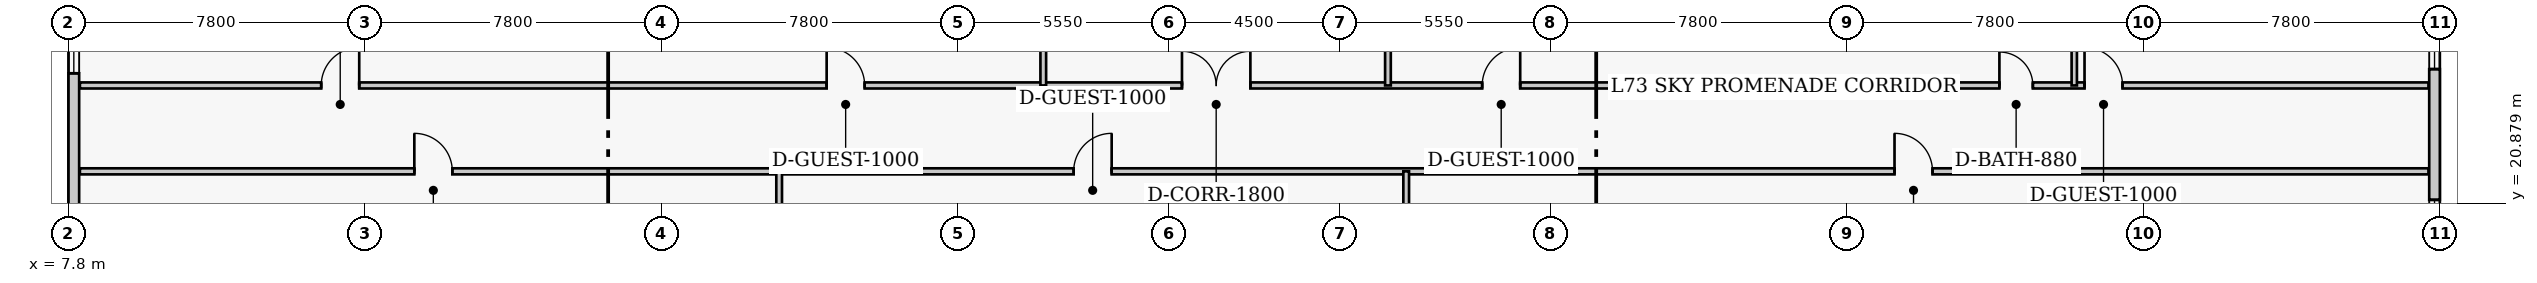
"""IFC4 building model, lengths in metres.
Left out: names, types, materials, properties, quantities, classifications, styles, units other than length and angle.
Written with IfcOpenShell. Run it as: python <this file> out.ifc"""

import sys

from ifc_helpers import new_model, si_unit, direction, frame, frame_2d, origin, place, context, subcontext, project, spatial, rectangle, extrude, element, fill, save


model = new_model("IFC4")
c1 = context("Model", 3, precision=1e-05, world=origin(), true_north=direction((0.0, 1.0)))
c2 = subcontext(c1, "Body", "Model", "MODEL_VIEW")
j1 = project(units=[si_unit("LENGTHUNIT", "METRE"), si_unit("PLANEANGLEUNIT", "RADIAN")], contexts=[c1])
p1 = place(None, origin())
s1 = spatial("IfcSite", under=j1, at=p1, CompositionType="ELEMENT")
p2 = place(p1, origin())
s2 = spatial("IfcBuilding", under=s1, at=p2, CompositionType="ELEMENT")
p3 = place(p2, frame((0.0, 0.0, 293.4)))
s3 = spatial("IfcBuildingStorey", under=s2, at=p3, CompositionType="ELEMENT", Elevation=293.4)
p4 = place(p3, frame((70.06, 13.96, 0.0), z_axis=(0.0, 0.0, 1.0), x_axis=(0.0, 1.0, 0.0)))
e1 = element("IfcWall", 1, at=p4, inside=s3, PredefinedType="SOLIDWALL", context=c2, shape_type="SweptSolid", body=[
    extrude(rectangle(XDim=29.68, YDim=0.28, at=frame_2d((14.84, 0.0))), origin(), (0.0, 0.0, 1.0), 3.71),
])
p5 = place(p4, frame((0.82, 0.0, 0.65)))
e2 = element("IfcOpeningElement", 2, at=p5, cuts=e1, PredefinedType="OPENING", context=c2, shape_type="SweptSolid", body=[
    extrude(rectangle(XDim=2.6, YDim=2.2, at=frame_2d((1.3, 1.1))), frame((0.0, 0.15, 0.0), z_axis=(0.0, -1.0, 0.0), x_axis=(1.0, 0.0, 0.0)), (0.0, 0.0, 1.0), 0.3),
])
p6 = place(p4, frame((4.41, 0.0, 0.65)))
e3 = element("IfcOpeningElement", 3, at=p6, cuts=e1, PredefinedType="OPENING", context=c2, shape_type="SweptSolid", body=[
    extrude(rectangle(XDim=2.6, YDim=2.2, at=frame_2d((1.3, 1.1))), frame((0.0, 0.15, 0.0), z_axis=(0.0, -1.0, 0.0), x_axis=(1.0, 0.0, 0.0)), (0.0, 0.0, 1.0), 0.3),
])
p7 = place(p4, frame((10.45, 0.0, 0.65)))
e4 = element("IfcOpeningElement", 4, at=p7, cuts=e1, PredefinedType="OPENING", context=c2, shape_type="SweptSolid", body=[
    extrude(rectangle(XDim=2.6, YDim=2.2, at=frame_2d((1.3, 1.1))), frame((0.0, 0.15, 0.0), z_axis=(0.0, -1.0, 0.0), x_axis=(1.0, 0.0, 0.0)), (0.0, 0.0, 1.0), 0.3),
])
p8 = place(p4, frame((13.54, 0.0, 0.65)))
e5 = element("IfcOpeningElement", 5, at=p8, cuts=e1, PredefinedType="OPENING", context=c2, shape_type="SweptSolid", body=[
    extrude(rectangle(XDim=2.6, YDim=2.2, at=frame_2d((1.3, 1.1))), frame((0.0, 0.15, 0.0), z_axis=(0.0, -1.0, 0.0), x_axis=(1.0, 0.0, 0.0)), (0.0, 0.0, 1.0), 0.3),
])
p9 = place(p4, frame((17.78, 0.0, 0.65)))
e6 = element("IfcOpeningElement", 6, at=p9, cuts=e1, PredefinedType="OPENING", context=c2, shape_type="SweptSolid", body=[
    extrude(rectangle(XDim=2.6, YDim=2.2, at=frame_2d((1.3, 1.1))), frame((0.0, 0.15, 0.0), z_axis=(0.0, -1.0, 0.0), x_axis=(1.0, 0.0, 0.0)), (0.0, 0.0, 1.0), 0.3),
])
p10 = place(p4, frame((22.02, 0.0, 0.65)))
e7 = element("IfcOpeningElement", 7, at=p10, cuts=e1, PredefinedType="OPENING", context=c2, shape_type="SweptSolid", body=[
    extrude(rectangle(XDim=2.6, YDim=2.2, at=frame_2d((1.3, 1.1))), frame((0.0, 0.15, 0.0), z_axis=(0.0, -1.0, 0.0), x_axis=(1.0, 0.0, 0.0)), (0.0, 0.0, 1.0), 0.3),
])
p11 = place(p4, frame((26.26, 0.0, 0.65)))
e8 = element("IfcOpeningElement", 8, at=p11, cuts=e1, PredefinedType="OPENING", context=c2, shape_type="SweptSolid", body=[
    extrude(rectangle(XDim=2.6, YDim=2.2, at=frame_2d((1.3, 1.1))), frame((0.0, 0.15, 0.0), z_axis=(0.0, -1.0, 0.0), x_axis=(1.0, 0.0, 0.0)), (0.0, 0.0, 1.0), 0.3),
])
p12 = place(p3, frame((7.94, 40.44, 0.0), z_axis=(0.0, 0.0, 1.0), x_axis=(0.0, -1.0, 0.0)))
e9 = element("IfcWall", 9, at=p12, inside=s3, PredefinedType="SOLIDWALL", context=c2, shape_type="SweptSolid", body=[
    extrude(rectangle(XDim=29.68, YDim=0.28, at=frame_2d((14.84, 0.0))), origin(), (0.0, 0.0, 1.0), 3.71),
])
p13 = place(p12, frame((0.82, 0.0, 0.65)))
e10 = element("IfcOpeningElement", 10, at=p13, cuts=e9, PredefinedType="OPENING", context=c2, shape_type="SweptSolid", body=[
    extrude(rectangle(XDim=2.6, YDim=2.2, at=frame_2d((1.3, 1.1))), frame((0.0, 0.15, 0.0), z_axis=(0.0, -1.0, 0.0), x_axis=(1.0, 0.0, 0.0)), (0.0, 0.0, 1.0), 0.3),
])
p14 = place(p12, frame((5.06, 0.0, 0.65)))
e11 = element("IfcOpeningElement", 11, at=p14, cuts=e9, PredefinedType="OPENING", context=c2, shape_type="SweptSolid", body=[
    extrude(rectangle(XDim=2.6, YDim=2.2, at=frame_2d((1.3, 1.1))), frame((0.0, 0.15, 0.0), z_axis=(0.0, -1.0, 0.0), x_axis=(1.0, 0.0, 0.0)), (0.0, 0.0, 1.0), 0.3),
])
p15 = place(p12, frame((9.3, 0.0, 0.65)))
e12 = element("IfcOpeningElement", 12, at=p15, cuts=e9, PredefinedType="OPENING", context=c2, shape_type="SweptSolid", body=[
    extrude(rectangle(XDim=2.6, YDim=2.2, at=frame_2d((1.3, 1.1))), frame((0.0, 0.15, 0.0), z_axis=(0.0, -1.0, 0.0), x_axis=(1.0, 0.0, 0.0)), (0.0, 0.0, 1.0), 0.3),
])
p16 = place(p12, frame((13.54, 0.0, 0.65)))
e13 = element("IfcOpeningElement", 13, at=p16, cuts=e9, PredefinedType="OPENING", context=c2, shape_type="SweptSolid", body=[
    extrude(rectangle(XDim=2.6, YDim=2.2, at=frame_2d((1.3, 1.1))), frame((0.0, 0.15, 0.0), z_axis=(0.0, -1.0, 0.0), x_axis=(1.0, 0.0, 0.0)), (0.0, 0.0, 1.0), 0.3),
])
p17 = place(p12, frame((22.02, 0.0, 0.65)))
e14 = element("IfcOpeningElement", 14, at=p17, cuts=e9, PredefinedType="OPENING", context=c2, shape_type="SweptSolid", body=[
    extrude(rectangle(XDim=2.6, YDim=2.2, at=frame_2d((1.3, 1.1))), frame((0.0, 0.15, 0.0), z_axis=(0.0, -1.0, 0.0), x_axis=(1.0, 0.0, 0.0)), (0.0, 0.0, 1.0), 0.3),
])
p18 = place(p12, frame((26.26, 0.0, 0.65)))
e15 = element("IfcOpeningElement", 15, at=p18, cuts=e9, PredefinedType="OPENING", context=c2, shape_type="SweptSolid", body=[
    extrude(rectangle(XDim=2.6, YDim=2.2, at=frame_2d((1.3, 1.1))), frame((0.0, 0.15, 0.0), z_axis=(0.0, -1.0, 0.0), x_axis=(1.0, 0.0, 0.0)), (0.0, 0.0, 1.0), 0.3),
])
p19 = place(p3, frame((8.1, 21.72, 0.0), z_axis=(0.0, 0.0, 1.0), x_axis=(1.0, 0.0, 0.0)))
e16 = element("IfcWall", 16, at=p19, inside=s3, PredefinedType="PARTITIONING", context=c2, shape_type="SweptSolid", body=[
    extrude(rectangle(XDim=61.8, YDim=0.16, at=frame_2d((30.9, 0.0))), origin(), (0.0, 0.0, 1.0), 3.71),
])
p20 = place(p19, frame((8.8, 0.0, 0.0)))
e17 = element("IfcOpeningElement", 17, at=p20, cuts=e16, PredefinedType="OPENING", context=c2, shape_type="SweptSolid", body=[
    extrude(rectangle(XDim=1.0, YDim=2.15, at=frame_2d((0.5, 1.075))), frame((0.0, 0.09, 0.0), z_axis=(0.0, -1.0, 0.0), x_axis=(1.0, 0.0, 0.0)), (0.0, 0.0, 1.0), 0.18),
])
p21 = place(p19, frame((26.15, 0.0, 0.0)))
e18 = element("IfcOpeningElement", 18, at=p21, cuts=e16, PredefinedType="OPENING", context=c2, shape_type="SweptSolid", body=[
    extrude(rectangle(XDim=1.0, YDim=2.15, at=frame_2d((0.5, 1.075))), frame((0.0, 0.09, 0.0), z_axis=(0.0, -1.0, 0.0), x_axis=(1.0, 0.0, 0.0)), (0.0, 0.0, 1.0), 0.18),
])
p22 = place(p19, frame((47.75, 0.0, 0.0)))
e19 = element("IfcOpeningElement", 19, at=p22, cuts=e16, PredefinedType="OPENING", context=c2, shape_type="SweptSolid", body=[
    extrude(rectangle(XDim=1.0, YDim=2.15, at=frame_2d((0.5, 1.075))), frame((0.0, 0.09, 0.0), z_axis=(0.0, -1.0, 0.0), x_axis=(1.0, 0.0, 0.0)), (0.0, 0.0, 1.0), 0.18),
])
p23 = place(p3, frame((8.1, 23.98, 0.0), z_axis=(0.0, 0.0, 1.0), x_axis=(1.0, 0.0, 0.0)))
e20 = element("IfcWall", 20, at=p23, inside=s3, PredefinedType="PARTITIONING", context=c2, shape_type="SweptSolid", body=[
    extrude(rectangle(XDim=61.8, YDim=0.16, at=frame_2d((30.9, 0.0))), origin(), (0.0, 0.0, 1.0), 3.71),
])
p24 = place(p23, frame((29.0, 0.0, 0.0)))
e21 = element("IfcOpeningElement", 21, at=p24, cuts=e20, PredefinedType="OPENING", context=c2, shape_type="SweptSolid", body=[
    extrude(rectangle(XDim=1.8, YDim=2.2, at=frame_2d((0.9, 1.1))), frame((0.0, 0.09, 0.0), z_axis=(0.0, -1.0, 0.0), x_axis=(1.0, 0.0, 0.0)), (0.0, 0.0, 1.0), 0.18),
])
p25 = place(p23, frame((19.65, 0.0, 0.0)))
e22 = element("IfcOpeningElement", 22, at=p25, cuts=e20, PredefinedType="OPENING", context=c2, shape_type="SweptSolid", body=[
    extrude(rectangle(XDim=1.0, YDim=2.15, at=frame_2d((0.5, 1.075))), frame((0.0, 0.09, 0.0), z_axis=(0.0, -1.0, 0.0), x_axis=(1.0, 0.0, 0.0)), (0.0, 0.0, 1.0), 0.18),
])
p26 = place(p23, frame((36.9, 0.0, 0.0)))
e23 = element("IfcOpeningElement", 23, at=p26, cuts=e20, PredefinedType="OPENING", context=c2, shape_type="SweptSolid", body=[
    extrude(rectangle(XDim=1.0, YDim=2.15, at=frame_2d((0.5, 1.075))), frame((0.0, 0.09, 0.0), z_axis=(0.0, -1.0, 0.0), x_axis=(1.0, 0.0, 0.0)), (0.0, 0.0, 1.0), 0.18),
])
p27 = place(p23, frame((6.35, 0.0, 0.0)))
e24 = element("IfcOpeningElement", 24, at=p27, cuts=e20, PredefinedType="OPENING", context=c2, shape_type="SweptSolid", body=[
    extrude(rectangle(XDim=1.0, YDim=2.15, at=frame_2d((0.5, 1.075))), frame((0.0, 0.09, 0.0), z_axis=(0.0, -1.0, 0.0), x_axis=(1.0, 0.0, 0.0)), (0.0, 0.0, 1.0), 0.18),
])
p28 = place(p23, frame((50.51, 0.0, 0.0)))
e25 = element("IfcOpeningElement", 25, at=p28, cuts=e20, PredefinedType="OPENING", context=c2, shape_type="SweptSolid", body=[
    extrude(rectangle(XDim=0.88, YDim=2.05, at=frame_2d((0.44, 1.025))), frame((0.0, 0.09, 0.0), z_axis=(0.0, -1.0, 0.0), x_axis=(1.0, 0.0, 0.0)), (0.0, 0.0, 1.0), 0.18),
])
p29 = place(p23, frame((52.75, 0.0, 0.0)))
e26 = element("IfcOpeningElement", 26, at=p29, cuts=e20, PredefinedType="OPENING", context=c2, shape_type="SweptSolid", body=[
    extrude(rectangle(XDim=1.0, YDim=2.15, at=frame_2d((0.5, 1.075))), frame((0.0, 0.09, 0.0), z_axis=(0.0, -1.0, 0.0), x_axis=(1.0, 0.0, 0.0)), (0.0, 0.0, 1.0), 0.18),
])
for number, where, z_axis, x_axis in (
    (27, (33.45, 23.98, 0.0), (0.0, 0.0, 1.0), (0.0, 1.0, 0.0)),
    (28, (42.52, 23.98, 0.0), (0.0, 0.0, 1.0), (0.0, 1.0, 0.0)),
):
    element("IfcWall", number, at=place(p3, frame(where, z_axis=z_axis, x_axis=x_axis)), inside=s3, PredefinedType="PARTITIONING", context=c2, shape_type="SweptSolid", body=[
        extrude(rectangle(XDim=5.57, YDim=0.15, at=frame_2d((2.785, 0.0))), origin(), (0.0, 0.0, 1.0), 3.71),
    ])
p30 = place(p3, frame((26.5, 8.2, 0.0), z_axis=(0.0, 0.0, 1.0), x_axis=(0.0, 1.0, 0.0)))
e29 = element("IfcWall", 29, at=p30, inside=s3, PredefinedType="PARTITIONING", context=c2, shape_type="SweptSolid", body=[
    extrude(rectangle(XDim=13.52, YDim=0.15, at=frame_2d((6.76, 0.0))), origin(), (0.0, 0.0, 1.0), 3.306),
])
p31 = place(p3, frame((43.0, 9.72, 0.0), z_axis=(0.0, 0.0, 1.0), x_axis=(0.0, 1.0, 0.0)))
e30 = element("IfcWall", 30, at=p31, inside=s3, PredefinedType="PARTITIONING", context=c2, shape_type="SweptSolid", body=[
    extrude(rectangle(XDim=12.0, YDim=0.15, at=frame_2d((6.0, 0.0))), origin(), (0.0, 0.0, 1.0), 3.71),
])
p32 = place(p3, frame((60.58, 23.98, 0.0), z_axis=(0.0, 0.0, 1.0), x_axis=(0.0, 1.0, 0.0)))
e31 = element("IfcWall", 31, at=p32, inside=s3, PredefinedType="PLUMBINGWALL", context=c2, shape_type="SweptSolid", body=[
    extrude(rectangle(XDim=7.32, YDim=0.14, at=frame_2d((3.66, 0.0))), origin(), (0.0, 0.0, 1.0), 3.71),
])
p33 = place(p6, origin())
e32 = element("IfcWindow", 32, at=p33, inside=s3, PartitioningType="SINGLE_PANEL", PredefinedType="WINDOW", context=c2, shape_type="SweptSolid", body=[
    extrude(rectangle(XDim=2.6, YDim=2.2, at=frame_2d((1.3, 1.1))), frame((0.0, 0.03, 0.0), z_axis=(0.0, -1.0, 0.0), x_axis=(1.0, 0.0, 0.0)), (0.0, 0.0, 1.0), 0.06),
])
fill(e3, e32)
p34 = place(p7, origin())
e33 = element("IfcWindow", 33, at=p34, inside=s3, PartitioningType="SINGLE_PANEL", PredefinedType="WINDOW", context=c2, shape_type="SweptSolid", body=[
    extrude(rectangle(XDim=2.6, YDim=2.2, at=frame_2d((1.3, 1.1))), frame((0.0, 0.03, 0.0), z_axis=(0.0, -1.0, 0.0), x_axis=(1.0, 0.0, 0.0)), (0.0, 0.0, 1.0), 0.06),
])
fill(e4, e33)
p35 = place(p16, origin())
e34 = element("IfcWindow", 34, at=p35, inside=s3, PartitioningType="SINGLE_PANEL", PredefinedType="WINDOW", context=c2, shape_type="SweptSolid", body=[
    extrude(rectangle(XDim=2.6, YDim=2.2, at=frame_2d((1.3, 1.1))), frame((0.0, 0.03, 0.0), z_axis=(0.0, -1.0, 0.0), x_axis=(1.0, 0.0, 0.0)), (0.0, 0.0, 1.0), 0.06),
])
fill(e13, e34)
p36 = place(p24, origin())
e35 = element("IfcDoor", 35, at=p36, inside=s3, OperationType="DOUBLE_DOOR_SINGLE_SWING", PredefinedType="DOOR", context=c2, shape_type="SweptSolid", body=[
    extrude(rectangle(XDim=1.8, YDim=2.2, at=frame_2d((0.9, 1.1))), frame((0.0, 0.025, 0.0), z_axis=(0.0, -1.0, 0.0), x_axis=(1.0, 0.0, 0.0)), (0.0, 0.0, 1.0), 0.05),
])
fill(e21, e35)
p37 = place(p25, origin())
e36 = element("IfcDoor", 36, at=p37, inside=s3, OperationType="SINGLE_SWING_LEFT", PredefinedType="DOOR", context=c2, shape_type="SweptSolid", body=[
    extrude(rectangle(XDim=1.0, YDim=2.15, at=frame_2d((0.5, 1.075))), frame((0.0, 0.025, 0.0), z_axis=(0.0, -1.0, 0.0), x_axis=(1.0, 0.0, 0.0)), (0.0, 0.0, 1.0), 0.05),
])
fill(e22, e36)
p38 = place(p26, origin())
e37 = element("IfcDoor", 37, at=p38, inside=s3, OperationType="SINGLE_SWING_RIGHT", PredefinedType="DOOR", context=c2, shape_type="SweptSolid", body=[
    extrude(rectangle(XDim=1.0, YDim=2.15, at=frame_2d((0.5, 1.075))), frame((0.0, 0.025, 0.0), z_axis=(0.0, -1.0, 0.0), x_axis=(1.0, 0.0, 0.0)), (0.0, 0.0, 1.0), 0.05),
])
fill(e23, e37)
p39 = place(p20, origin())
e38 = element("IfcDoor", 38, at=p39, inside=s3, OperationType="SINGLE_SWING_LEFT", PredefinedType="DOOR", context=c2, shape_type="SweptSolid", body=[
    extrude(rectangle(XDim=1.0, YDim=2.15, at=frame_2d((0.5, 1.075))), frame((0.0, 0.025, 0.0), z_axis=(0.0, -1.0, 0.0), x_axis=(1.0, 0.0, 0.0)), (0.0, 0.0, 1.0), 0.05),
])
fill(e17, e38)
p40 = place(p21, origin())
e39 = element("IfcDoor", 39, at=p40, inside=s3, OperationType="SINGLE_SWING_RIGHT", PredefinedType="DOOR", context=c2, shape_type="SweptSolid", body=[
    extrude(rectangle(XDim=1.0, YDim=2.15, at=frame_2d((0.5, 1.075))), frame((0.0, 0.025, 0.0), z_axis=(0.0, -1.0, 0.0), x_axis=(1.0, 0.0, 0.0)), (0.0, 0.0, 1.0), 0.05),
])
fill(e18, e39)
p41 = place(p22, origin())
e40 = element("IfcDoor", 40, at=p41, inside=s3, OperationType="SINGLE_SWING_LEFT", PredefinedType="DOOR", context=c2, shape_type="SweptSolid", body=[
    extrude(rectangle(XDim=1.0, YDim=2.15, at=frame_2d((0.5, 1.075))), frame((0.0, 0.025, 0.0), z_axis=(0.0, -1.0, 0.0), x_axis=(1.0, 0.0, 0.0)), (0.0, 0.0, 1.0), 0.05),
])
fill(e19, e40)
p42 = place(p27, origin())
e41 = element("IfcDoor", 41, at=p42, inside=s3, OperationType="SINGLE_SWING_RIGHT", PredefinedType="DOOR", context=c2, shape_type="SweptSolid", body=[
    extrude(rectangle(XDim=1.0, YDim=2.15, at=frame_2d((0.5, 1.075))), frame((0.0, 0.025, 0.0), z_axis=(0.0, -1.0, 0.0), x_axis=(1.0, 0.0, 0.0)), (0.0, 0.0, 1.0), 0.05),
])
fill(e24, e41)
p43 = place(p28, origin())
e42 = element("IfcDoor", 42, at=p43, inside=s3, OperationType="SINGLE_SWING_LEFT", PredefinedType="DOOR", context=c2, shape_type="SweptSolid", body=[
    extrude(rectangle(XDim=0.88, YDim=2.05, at=frame_2d((0.44, 1.025))), frame((0.0, 0.025, 0.0), z_axis=(0.0, -1.0, 0.0), x_axis=(1.0, 0.0, 0.0)), (0.0, 0.0, 1.0), 0.05),
])
fill(e25, e42)
p44 = place(p29, origin())
e43 = element("IfcDoor", 43, at=p44, inside=s3, OperationType="SINGLE_SWING_LEFT", PredefinedType="DOOR", context=c2, shape_type="SweptSolid", body=[
    extrude(rectangle(XDim=1.0, YDim=2.15, at=frame_2d((0.5, 1.075))), frame((0.0, 0.025, 0.0), z_axis=(0.0, -1.0, 0.0), x_axis=(1.0, 0.0, 0.0)), (0.0, 0.0, 1.0), 0.05),
])
fill(e26, e43)
save(model, sys.argv[1])
